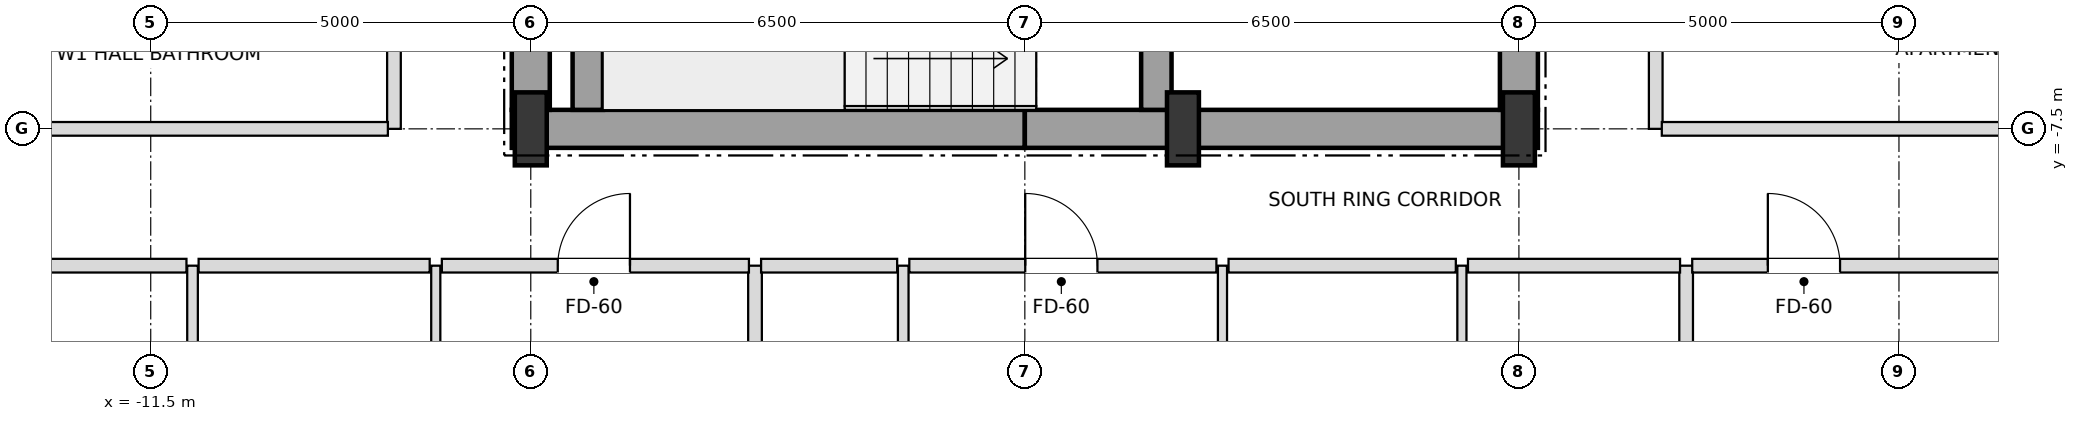
"""IFC4 building model, lengths in metres.
Left out: names, types, materials, properties, quantities, classifications, styles, units other than length and angle.
Written with IfcOpenShell. Run it as: python <this file> out.ifc"""

import sys

from ifc_helpers import new_model, si_unit, direction, frame, frame_2d, origin, origin_2d, place, context, subcontext, project, spatial, rectangle, i_section, extrude, element, fill, save


model = new_model("IFC4")
c1 = context("Model", 3, precision=1e-05, world=origin(), true_north=direction((0.0, 1.0)))
c2 = subcontext(c1, "Body", "Model", "MODEL_VIEW")
j1 = project(units=[si_unit("LENGTHUNIT", "METRE"), si_unit("PLANEANGLEUNIT", "RADIAN")], contexts=[c1])
p1 = place(None, origin())
s1 = spatial("IfcSite", under=j1, at=p1, CompositionType="ELEMENT")
p2 = place(p1, origin())
s2 = spatial("IfcBuilding", under=s1, at=p2, CompositionType="ELEMENT")
p3 = place(p2, frame((0.0, 0.0, 46.8)))
s3 = spatial("IfcBuildingStorey", under=s2, at=p3, CompositionType="ELEMENT", Elevation=46.8)
for number, where, z_axis, x_axis in (
    (1, (-6.5, -7.5, 0.0), (0.0, 0.0, 1.0), (1.0, 0.0, 0.0)),
    (2, (2.08, -7.5, 0.0), (0.0, 0.0, 1.0), (1.0, 0.0, 0.0)),
    (3, (6.5, -7.5, 0.0), (0.0, 0.0, 1.0), (1.0, 0.0, 0.0)),
):
    element("IfcColumn", number, at=place(p3, frame(where, z_axis=z_axis, x_axis=x_axis)), inside=s3, PredefinedType="COLUMN", context=c2, shape_type="SweptSolid", body=[
        extrude(i_section(OverallWidth=0.42, OverallDepth=0.96, WebThickness=0.022, FlangeThickness=0.034, at=origin_2d()), origin(), (0.0, 0.0, 1.0), 3.6),
    ])
for number, where, z_axis, x_axis in (
    (4, (-6.75, -7.5, 0.0), (0.0, 0.0, 1.0), (1.0, 0.0, 0.0)),
    (5, (0.0, -7.5, 0.0), (0.0, 0.0, 1.0), (1.0, 0.0, 0.0)),
):
    element("IfcWall", number, at=place(p3, frame(where, z_axis=z_axis, x_axis=x_axis)), inside=s3, PredefinedType="SHEAR", context=c2, shape_type="SweptSolid", body=[
        extrude(rectangle(XDim=6.75, YDim=0.5, at=frame_2d((3.375, 0.0))), origin(), (0.0, 0.0, 1.0), 3.38),
    ])
p4 = place(p3, frame((-6.5, -7.25, 0.0), z_axis=(0.0, 0.0, 1.0), x_axis=(0.0, 1.0, 0.0)))
e6 = element("IfcWall", 6, at=p4, inside=s3, PredefinedType="SHEAR", context=c2, shape_type="SweptSolid", body=[
    extrude(rectangle(XDim=3.55, YDim=0.5, at=frame_2d((1.775, 0.0))), origin(), (0.0, 0.0, 1.0), 3.38),
])
p5 = place(p3, frame((6.5, -7.25, 0.0), z_axis=(0.0, 0.0, 1.0), x_axis=(0.0, 1.0, 0.0)))
e7 = element("IfcWall", 7, at=p5, inside=s3, PredefinedType="SHEAR", context=c2, shape_type="SweptSolid", body=[
    extrude(rectangle(XDim=5.75, YDim=0.5, at=frame_2d((2.875, 0.0))), origin(), (0.0, 0.0, 1.0), 3.38),
])
p6 = place(p5, frame((0.85, 0.0, 0.0)))
e8 = element("IfcOpeningElement", 8, at=p6, cuts=e7, PredefinedType="OPENING", context=c2, shape_type="SweptSolid", body=[
    extrude(rectangle(XDim=1.05, YDim=2.15, at=frame_2d((0.525, 1.075))), frame((0.0, 0.26, 0.0), z_axis=(0.0, -1.0, 0.0), x_axis=(1.0, 0.0, 0.0)), (0.0, 0.0, 1.0), 0.52),
])
p7 = place(p3, frame((-5.75, -7.25, 0.0), z_axis=(0.0, 0.0, 1.0), x_axis=(0.0, 1.0, 0.0)))
e9 = element("IfcWall", 9, at=p7, inside=s3, PredefinedType="SHEAR", context=c2, shape_type="SweptSolid", body=[
    extrude(rectangle(XDim=2.9, YDim=0.4, at=frame_2d((1.45, 0.0))), origin(), (0.0, 0.0, 1.0), 3.38),
])
p8 = place(p3, frame((1.73, -7.25, 0.0), z_axis=(0.0, 0.0, 1.0), x_axis=(0.0, 1.0, 0.0)))
e10 = element("IfcWall", 10, at=p8, inside=s3, PredefinedType="SHEAR", context=c2, shape_type="SweptSolid", body=[
    extrude(rectangle(XDim=3.3, YDim=0.4, at=frame_2d((1.65, 0.0))), origin(), (0.0, 0.0, 1.0), 3.38),
])
p9 = place(p8, frame((0.9, 0.0, 0.0)))
e11 = element("IfcOpeningElement", 11, at=p9, cuts=e10, PredefinedType="OPENING", context=c2, shape_type="SweptSolid", body=[
    extrude(rectangle(XDim=1.05, YDim=2.15, at=frame_2d((0.525, 1.075))), frame((0.0, 0.21, 0.0), z_axis=(0.0, -1.0, 0.0), x_axis=(1.0, 0.0, 0.0)), (0.0, 0.0, 1.0), 0.42),
])
p10 = place(p3, frame((-10.95, -18.9, 0.0), z_axis=(0.0, 0.0, 1.0), x_axis=(0.0, 1.0, 0.0)))
e12 = element("IfcWall", 12, at=p10, inside=s3, PredefinedType="PARTITIONING", context=c2, shape_type="SweptSolid", body=[
    extrude(rectangle(XDim=9.6, YDim=0.14, at=frame_2d((4.8, 0.0))), origin(), (0.0, 0.0, 1.0), 2.816),
])
p11 = place(p10, frame((4.35, 0.0, 0.0)))
e13 = element("IfcOpeningElement", 13, at=p11, cuts=e12, PredefinedType="OPENING", context=c2, shape_type="SweptSolid", body=[
    extrude(rectangle(XDim=0.9, YDim=2.1, at=frame_2d((0.45, 1.05))), frame((0.0, 0.08, 0.0), z_axis=(0.0, -1.0, 0.0), x_axis=(1.0, 0.0, 0.0)), (0.0, 0.0, 1.0), 0.16),
])
p12 = place(p3, frame((-8.3, -7.5, 0.0), z_axis=(0.0, 0.0, 1.0), x_axis=(0.0, 1.0, 0.0)))
e14 = element("IfcWall", 14, at=p12, inside=s3, PredefinedType="PARTITIONING", context=c2, shape_type="SweptSolid", body=[
    extrude(rectangle(XDim=15.0, YDim=0.18, at=frame_2d((7.5, 0.0))), origin(), (0.0, 0.0, 1.0), 3.38),
])
p13 = place(p12, frame((3.475, 0.0, 0.0)))
e15 = element("IfcOpeningElement", 15, at=p13, cuts=e14, PredefinedType="OPENING", context=c2, shape_type="SweptSolid", body=[
    extrude(rectangle(XDim=0.95, YDim=2.15, at=frame_2d((0.475, 1.075))), frame((0.0, 0.1, 0.0), z_axis=(0.0, -1.0, 0.0), x_axis=(1.0, 0.0, 0.0)), (0.0, 0.0, 1.0), 0.2),
])
p14 = place(p3, frame((-7.75, -18.9, 0.0), z_axis=(0.0, 0.0, 1.0), x_axis=(0.0, 1.0, 0.0)))
e16 = element("IfcWall", 16, at=p14, inside=s3, PredefinedType="PARTITIONING", context=c2, shape_type="SweptSolid", body=[
    extrude(rectangle(XDim=9.6, YDim=0.12, at=frame_2d((4.8, 0.0))), origin(), (0.0, 0.0, 1.0), 2.816),
])
p15 = place(p14, frame((4.325, 0.0, 0.0)))
e17 = element("IfcOpeningElement", 17, at=p15, cuts=e16, PredefinedType="OPENING", context=c2, shape_type="SweptSolid", body=[
    extrude(rectangle(XDim=0.95, YDim=2.1, at=frame_2d((0.475, 1.05))), frame((0.0, 0.07, 0.0), z_axis=(0.0, -1.0, 0.0), x_axis=(1.0, 0.0, 0.0)), (0.0, 0.0, 1.0), 0.14),
])
p16 = place(p3, frame((-3.55, -24.9, 0.0), z_axis=(0.0, 0.0, 1.0), x_axis=(0.0, 1.0, 0.0)))
e18 = element("IfcWall", 18, at=p16, inside=s3, PredefinedType="PARTITIONING", context=c2, shape_type="SweptSolid", body=[
    extrude(rectangle(XDim=15.6, YDim=0.18, at=frame_2d((7.8, 0.0))), origin(), (0.0, 0.0, 1.0), 2.816),
])
p17 = place(p3, frame((-1.6, -18.9, 0.0), z_axis=(0.0, 0.0, 1.0), x_axis=(0.0, 1.0, 0.0)))
e19 = element("IfcWall", 19, at=p17, inside=s3, PredefinedType="PARTITIONING", context=c2, shape_type="SweptSolid", body=[
    extrude(rectangle(XDim=9.6, YDim=0.14, at=frame_2d((4.8, 0.0))), origin(), (0.0, 0.0, 1.0), 2.948),
])
p18 = place(p17, frame((4.35, 0.0, 0.0)))
e20 = element("IfcOpeningElement", 20, at=p18, cuts=e19, PredefinedType="OPENING", context=c2, shape_type="SweptSolid", body=[
    extrude(rectangle(XDim=0.9, YDim=2.1, at=frame_2d((0.45, 1.05))), frame((0.0, 0.08, 0.0), z_axis=(0.0, -1.0, 0.0), x_axis=(1.0, 0.0, 0.0)), (0.0, 0.0, 1.0), 0.16),
])
p19 = place(p3, frame((2.6, -24.9, 0.0), z_axis=(0.0, 0.0, 1.0), x_axis=(0.0, 1.0, 0.0)))
e21 = element("IfcWall", 21, at=p19, inside=s3, PredefinedType="PARTITIONING", context=c2, shape_type="SweptSolid", body=[
    extrude(rectangle(XDim=15.6, YDim=0.12, at=frame_2d((7.8, 0.0))), origin(), (0.0, 0.0, 1.0), 2.816),
])
p20 = place(p19, frame((10.325, 0.0, 0.0)))
e22 = element("IfcOpeningElement", 22, at=p20, cuts=e21, PredefinedType="OPENING", context=c2, shape_type="SweptSolid", body=[
    extrude(rectangle(XDim=0.95, YDim=2.1, at=frame_2d((0.475, 1.05))), frame((0.0, 0.07, 0.0), z_axis=(0.0, -1.0, 0.0), x_axis=(1.0, 0.0, 0.0)), (0.0, 0.0, 1.0), 0.14),
])
p21 = place(p19, frame((2.55, 0.0, 0.0)))
e23 = element("IfcOpeningElement", 23, at=p21, cuts=e21, PredefinedType="OPENING", context=c2, shape_type="SweptSolid", body=[
    extrude(rectangle(XDim=0.9, YDim=2.1, at=frame_2d((0.45, 1.05))), frame((0.0, 0.07, 0.0), z_axis=(0.0, -1.0, 0.0), x_axis=(1.0, 0.0, 0.0)), (0.0, 0.0, 1.0), 0.14),
])
p22 = place(p3, frame((5.75, -24.9, 0.0), z_axis=(0.0, 0.0, 1.0), x_axis=(0.0, 1.0, 0.0)))
e24 = element("IfcWall", 24, at=p22, inside=s3, PredefinedType="PARTITIONING", context=c2, shape_type="SweptSolid", body=[
    extrude(rectangle(XDim=15.6, YDim=0.12, at=frame_2d((7.8, 0.0))), origin(), (0.0, 0.0, 1.0), 2.816),
])
p23 = place(p22, frame((10.35, 0.0, 0.0)))
e25 = element("IfcOpeningElement", 25, at=p23, cuts=e24, PredefinedType="OPENING", context=c2, shape_type="SweptSolid", body=[
    extrude(rectangle(XDim=0.9, YDim=2.1, at=frame_2d((0.45, 1.05))), frame((0.0, 0.07, 0.0), z_axis=(0.0, -1.0, 0.0), x_axis=(1.0, 0.0, 0.0)), (0.0, 0.0, 1.0), 0.14),
])
p24 = place(p22, frame((2.55, 0.0, 0.0)))
e26 = element("IfcOpeningElement", 26, at=p24, cuts=e24, PredefinedType="OPENING", context=c2, shape_type="SweptSolid", body=[
    extrude(rectangle(XDim=0.9, YDim=2.1, at=frame_2d((0.45, 1.05))), frame((0.0, 0.07, 0.0), z_axis=(0.0, -1.0, 0.0), x_axis=(1.0, 0.0, 0.0)), (0.0, 0.0, 1.0), 0.14),
])
p25 = place(p3, frame((8.3, -7.5, 0.0), z_axis=(0.0, 0.0, 1.0), x_axis=(0.0, 1.0, 0.0)))
e27 = element("IfcWall", 27, at=p25, inside=s3, PredefinedType="PARTITIONING", context=c2, shape_type="SweptSolid", body=[
    extrude(rectangle(XDim=15.0, YDim=0.18, at=frame_2d((7.5, 0.0))), origin(), (0.0, 0.0, 1.0), 3.38),
])
p26 = place(p25, frame((3.475, 0.0, 0.0)))
e28 = element("IfcOpeningElement", 28, at=p26, cuts=e27, PredefinedType="OPENING", context=c2, shape_type="SweptSolid", body=[
    extrude(rectangle(XDim=0.95, YDim=2.15, at=frame_2d((0.475, 1.075))), frame((0.0, 0.1, 0.0), z_axis=(0.0, -1.0, 0.0), x_axis=(1.0, 0.0, 0.0)), (0.0, 0.0, 1.0), 0.2),
])
p27 = place(p3, frame((8.7, -24.9, 0.0), z_axis=(0.0, 0.0, 1.0), x_axis=(0.0, 1.0, 0.0)))
e29 = element("IfcWall", 29, at=p27, inside=s3, PredefinedType="PARTITIONING", context=c2, shape_type="SweptSolid", body=[
    extrude(rectangle(XDim=15.6, YDim=0.18, at=frame_2d((7.8, 0.0))), origin(), (0.0, 0.0, 1.0), 2.816),
])
p28 = place(p3, frame((-12.82, -9.3, 0.0), z_axis=(0.0, 0.0, 1.0), x_axis=(1.0, 0.0, 0.0)))
e30 = element("IfcWall", 30, at=p28, inside=s3, PredefinedType="PARTITIONING", context=c2, shape_type="SweptSolid", body=[
    extrude(rectangle(XDim=1.79, YDim=0.18, at=frame_2d((0.895, 0.0))), origin(), (0.0, 0.0, 1.0), 3.38),
])
p29 = place(p3, frame((-10.87, -9.3, 0.0), z_axis=(0.0, 0.0, 1.0), x_axis=(1.0, 0.0, 0.0)))
e31 = element("IfcWall", 31, at=p29, inside=s3, PredefinedType="PARTITIONING", context=c2, shape_type="SweptSolid", body=[
    extrude(rectangle(XDim=3.04, YDim=0.18, at=frame_2d((1.52, 0.0))), origin(), (0.0, 0.0, 1.0), 3.38),
])
p30 = place(p3, frame((-7.67, -9.3, 0.0), z_axis=(0.0, 0.0, 1.0), x_axis=(1.0, 0.0, 0.0)))
e32 = element("IfcWall", 32, at=p30, inside=s3, PredefinedType="PARTITIONING", context=c2, shape_type="SweptSolid", body=[
    extrude(rectangle(XDim=4.04, YDim=0.18, at=frame_2d((2.02, 0.0))), origin(), (0.0, 0.0, 1.0), 2.816),
])
p31 = place(p30, frame((1.525, 0.0, 0.0)))
e33 = element("IfcOpeningElement", 33, at=p31, cuts=e32, PredefinedType="OPENING", context=c2, shape_type="SweptSolid", body=[
    extrude(rectangle(XDim=0.95, YDim=2.15, at=frame_2d((0.475, 1.075))), frame((0.0, 0.1, 0.0), z_axis=(0.0, -1.0, 0.0), x_axis=(1.0, 0.0, 0.0)), (0.0, 0.0, 1.0), 0.2),
])
p32 = place(p3, frame((-3.47, -9.3, 0.0), z_axis=(0.0, 0.0, 1.0), x_axis=(1.0, 0.0, 0.0)))
e34 = element("IfcWall", 34, at=p32, inside=s3, PredefinedType="PARTITIONING", context=c2, shape_type="SweptSolid", body=[
    extrude(rectangle(XDim=1.79, YDim=0.18, at=frame_2d((0.895, 0.0))), origin(), (0.0, 0.0, 1.0), 3.38),
])
p33 = place(p3, frame((-1.52, -9.3, 0.0), z_axis=(0.0, 0.0, 1.0), x_axis=(1.0, 0.0, 0.0)))
e35 = element("IfcWall", 35, at=p33, inside=s3, PredefinedType="PARTITIONING", context=c2, shape_type="SweptSolid", body=[
    extrude(rectangle(XDim=4.04, YDim=0.18, at=frame_2d((2.02, 0.0))), origin(), (0.0, 0.0, 1.0), 3.38),
])
p34 = place(p33, frame((1.525, 0.0, 0.0)))
e36 = element("IfcOpeningElement", 36, at=p34, cuts=e35, PredefinedType="OPENING", context=c2, shape_type="SweptSolid", body=[
    extrude(rectangle(XDim=0.95, YDim=2.15, at=frame_2d((0.475, 1.075))), frame((0.0, 0.1, 0.0), z_axis=(0.0, -1.0, 0.0), x_axis=(1.0, 0.0, 0.0)), (0.0, 0.0, 1.0), 0.2),
])
p35 = place(p3, frame((2.68, -9.3, 0.0), z_axis=(0.0, 0.0, 1.0), x_axis=(1.0, 0.0, 0.0)))
e37 = element("IfcWall", 37, at=p35, inside=s3, PredefinedType="PARTITIONING", context=c2, shape_type="SweptSolid", body=[
    extrude(rectangle(XDim=2.99, YDim=0.18, at=frame_2d((1.495, 0.0))), origin(), (0.0, 0.0, 1.0), 3.38),
])
p36 = place(p3, frame((5.83, -9.3, 0.0), z_axis=(0.0, 0.0, 1.0), x_axis=(1.0, 0.0, 0.0)))
e38 = element("IfcWall", 38, at=p36, inside=s3, PredefinedType="PARTITIONING", context=c2, shape_type="SweptSolid", body=[
    extrude(rectangle(XDim=2.79, YDim=0.18, at=frame_2d((1.395, 0.0))), origin(), (0.0, 0.0, 1.0), 2.816),
])
p37 = place(p3, frame((8.78, -9.3, 0.0), z_axis=(0.0, 0.0, 1.0), x_axis=(1.0, 0.0, 0.0)))
e39 = element("IfcWall", 39, at=p37, inside=s3, PredefinedType="PARTITIONING", context=c2, shape_type="SweptSolid", body=[
    extrude(rectangle(XDim=5.19, YDim=0.18, at=frame_2d((2.595, 0.0))), origin(), (0.0, 0.0, 1.0), 3.38),
])
p38 = place(p37, frame((0.995, 0.0, 0.0)))
e40 = element("IfcOpeningElement", 40, at=p38, cuts=e39, PredefinedType="OPENING", context=c2, shape_type="SweptSolid", body=[
    extrude(rectangle(XDim=0.95, YDim=2.15, at=frame_2d((0.475, 1.075))), frame((0.0, 0.1, 0.0), z_axis=(0.0, -1.0, 0.0), x_axis=(1.0, 0.0, 0.0)), (0.0, 0.0, 1.0), 0.2),
])
for number, where, z_axis, x_axis in (
    (41, (-16.02, -7.5, 0.0), (0.0, 0.0, 1.0), (1.0, 0.0, 0.0)),
    (42, (8.38, -7.5, 0.0), (0.0, 0.0, 1.0), (1.0, 0.0, 0.0)),
):
    element("IfcWall", number, at=place(p3, frame(where, z_axis=z_axis, x_axis=x_axis)), inside=s3, PredefinedType="PARTITIONING", context=c2, shape_type="SweptSolid", body=[
        extrude(rectangle(XDim=7.64, YDim=0.18, at=frame_2d((3.82, 0.0))), origin(), (0.0, 0.0, 1.0), 2.816),
    ])
p39 = place(p31, origin())
e43 = element("IfcDoor", 43, at=p39, inside=s3, OperationType="SINGLE_SWING_RIGHT", PredefinedType="DOOR", context=c2, shape_type="SweptSolid", body=[
    extrude(rectangle(XDim=0.95, YDim=2.15, at=frame_2d((0.475, 1.075))), frame((0.0, 0.025, 0.0), z_axis=(0.0, -1.0, 0.0), x_axis=(1.0, 0.0, 0.0)), (0.0, 0.0, 1.0), 0.05),
])
fill(e33, e43)
p40 = place(p34, origin())
e44 = element("IfcDoor", 44, at=p40, inside=s3, OperationType="SINGLE_SWING_LEFT", PredefinedType="DOOR", context=c2, shape_type="SweptSolid", body=[
    extrude(rectangle(XDim=0.95, YDim=2.15, at=frame_2d((0.475, 1.075))), frame((0.0, 0.025, 0.0), z_axis=(0.0, -1.0, 0.0), x_axis=(1.0, 0.0, 0.0)), (0.0, 0.0, 1.0), 0.05),
])
fill(e36, e44)
p41 = place(p38, origin())
e45 = element("IfcDoor", 45, at=p41, inside=s3, OperationType="SINGLE_SWING_LEFT", PredefinedType="DOOR", context=c2, shape_type="SweptSolid", body=[
    extrude(rectangle(XDim=0.95, YDim=2.15, at=frame_2d((0.475, 1.075))), frame((0.0, 0.025, 0.0), z_axis=(0.0, -1.0, 0.0), x_axis=(1.0, 0.0, 0.0)), (0.0, 0.0, 1.0), 0.05),
])
fill(e40, e45)
save(model, sys.argv[1])
